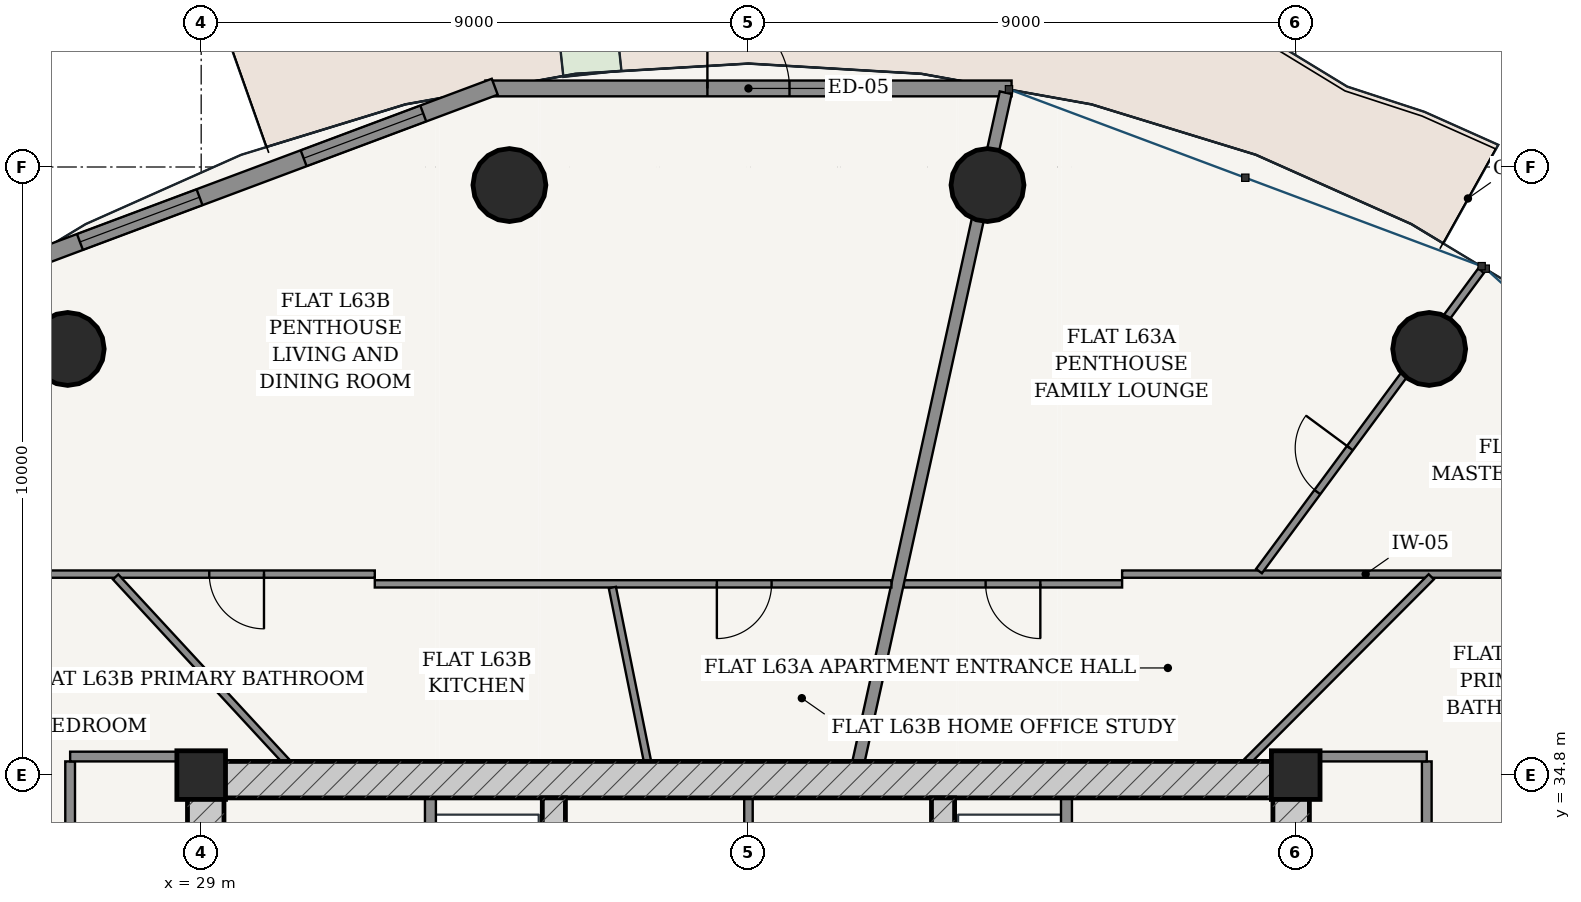
"""IFC4 building model, lengths in metres.
Left out: names, types, materials, properties, quantities, classifications, styles, units other than length and angle.
Written with IfcOpenShell. Run it as: python <this file> out.ifc"""

import sys

from ifc_helpers import new_model, si_unit, direction, frame, frame_2d, origin, origin_2d, place, context, subcontext, project, spatial, rectangle, hollow_circle, extrude, source, transform, mapped, element, fill, save


model = new_model("IFC4")
c1 = context("Model", 3, precision=1e-05, world=origin(), true_north=direction((-0.2419218956, 0.970295726276)))
c2 = subcontext(c1, "Body", "Model", "MODEL_VIEW")
j1 = project(units=[si_unit("LENGTHUNIT", "METRE"), si_unit("PLANEANGLEUNIT", "RADIAN")], contexts=[c1])
p1 = place(None, origin())
s1 = spatial("IfcSite", under=j1, at=p1, CompositionType="ELEMENT")
p2 = place(p1, origin())
s2 = spatial("IfcBuilding", under=s1, at=p2, CompositionType="ELEMENT")
p3 = place(p2, frame((0.0, 0.0, 239.3)))
s3 = spatial("IfcBuildingStorey", under=s2, at=p3, CompositionType="ELEMENT", Elevation=239.3)
for number, where, z_axis, x_axis in (
    (1, (47.0, 34.8, 0.0), (0.0, 0.0, 1.0), (1.0, 0.0, 0.0)),
    (2, (29.0, 34.8, 0.0), (0.0, 0.0, 1.0), (1.0, 0.0, 0.0)),
):
    element("IfcColumn", number, at=place(p3, frame(where, z_axis=z_axis, x_axis=x_axis)), inside=s3, PredefinedType="COLUMN", context=c2, shape_type="SweptSolid", body=[
        extrude(rectangle(XDim=0.8, YDim=0.8, at=origin_2d()), origin(), (0.0, 0.0, 1.0), 3.7),
    ])
p4 = place(p3, frame((28.775, 34.725, 0.0), z_axis=(0.0, 0.0, 1.0), x_axis=(1.0, 0.0, 0.0)))
e3 = element("IfcWall", 3, at=p4, inside=s3, PredefinedType="SHEAR", context=c2, shape_type="SweptSolid", body=[
    extrude(rectangle(XDim=18.45, YDim=0.6, at=frame_2d((9.225, 0.0))), origin(), (0.0, 0.0, 1.0), 3.25),
])
p5 = place(p3, frame((29.075, 19.175, 0.0), z_axis=(0.0, 0.0, 1.0), x_axis=(0.0, 1.0, 0.0)))
e4 = element("IfcWall", 4, at=p5, inside=s3, PredefinedType="SHEAR", context=c2, shape_type="SweptSolid", body=[
    extrude(rectangle(XDim=15.25, YDim=0.6, at=frame_2d((7.625, 0.0))), origin(), (0.0, 0.0, 1.0), 3.25),
])
p6 = place(p5, frame((9.875, 0.0, 0.0)))
e5 = element("IfcOpeningElement", 5, at=p6, cuts=e4, PredefinedType="OPENING", context=c2, shape_type="SweptSolid", body=[
    extrude(rectangle(XDim=1.5, YDim=2.2, at=frame_2d((0.75, 1.1))), frame((0.0, 0.31, 0.0), z_axis=(0.0, -1.0, 0.0), x_axis=(1.0, 0.0, 0.0)), (0.0, 0.0, 1.0), 0.62),
])
p7 = place(p3, frame((46.925, 19.175, 0.0), z_axis=(0.0, 0.0, 1.0), x_axis=(0.0, 1.0, 0.0)))
e6 = element("IfcWall", 6, at=p7, inside=s3, PredefinedType="SHEAR", context=c2, shape_type="SweptSolid", body=[
    extrude(rectangle(XDim=15.25, YDim=0.6, at=frame_2d((7.625, 0.0))), origin(), (0.0, 0.0, 1.0), 3.25),
])
p8 = place(p7, frame((9.875, 0.0, 0.0)))
e7 = element("IfcOpeningElement", 7, at=p8, cuts=e6, PredefinedType="OPENING", context=c2, shape_type="SweptSolid", body=[
    extrude(rectangle(XDim=1.5, YDim=2.2, at=frame_2d((0.75, 1.1))), frame((0.0, 0.31, 0.0), z_axis=(0.0, -1.0, 0.0), x_axis=(1.0, 0.0, 0.0)), (0.0, 0.0, 1.0), 0.62),
])
p9 = place(p3, frame((34.8, 19.175, 0.0), z_axis=(0.0, 0.0, 1.0), x_axis=(0.0, 1.0, 0.0)))
e8 = element("IfcWall", 8, at=p9, inside=s3, PredefinedType="SHEAR", context=c2, shape_type="SweptSolid", body=[
    extrude(rectangle(XDim=15.25, YDim=0.38, at=frame_2d((7.625, 0.0))), origin(), (0.0, 0.0, 1.0), 3.25),
])
p10 = place(p9, frame((7.8, 0.0, 0.0)))
e9 = element("IfcOpeningElement", 9, at=p10, cuts=e8, PredefinedType="OPENING", context=c2, shape_type="SweptSolid", body=[
    extrude(rectangle(XDim=1.05, YDim=2.15, at=frame_2d((0.525, 1.075))), frame((0.0, 0.2, 0.0), z_axis=(0.0, -1.0, 0.0), x_axis=(1.0, 0.0, 0.0)), (0.0, 0.0, 1.0), 0.4),
])
p11 = place(p3, frame((41.2, 19.175, 0.0), z_axis=(0.0, 0.0, 1.0), x_axis=(0.0, 1.0, 0.0)))
e10 = element("IfcWall", 10, at=p11, inside=s3, PredefinedType="SHEAR", context=c2, shape_type="SweptSolid", body=[
    extrude(rectangle(XDim=15.25, YDim=0.38, at=frame_2d((7.625, 0.0))), origin(), (0.0, 0.0, 1.0), 3.25),
])
p12 = place(p11, frame((7.8, 0.0, 0.0)))
e11 = element("IfcOpeningElement", 11, at=p12, cuts=e10, PredefinedType="OPENING", context=c2, shape_type="SweptSolid", body=[
    extrude(rectangle(XDim=1.05, YDim=2.15, at=frame_2d((0.525, 1.075))), frame((0.0, 0.2, 0.0), z_axis=(0.0, -1.0, 0.0), x_axis=(1.0, 0.0, 0.0)), (0.0, 0.0, 1.0), 0.4),
])
for number, where, z_axis, x_axis in (
    (12, (49.195, 41.808, 0.0), (0.0, 0.0, 1.0), (1.0, 0.0, 0.0)),
    (13, (41.931, 44.503, 0.0), (0.0, 0.0, 1.0), (1.0, 0.0, 0.0)),
    (14, (34.069, 44.503, 0.0), (0.0, 0.0, 1.0), (1.0, 0.0, 0.0)),
    (15, (26.805, 41.808, 0.0), (0.0, 0.0, 1.0), (1.0, 0.0, 0.0)),
):
    element("IfcColumn", number, at=place(p3, frame(where, z_axis=z_axis, x_axis=x_axis)), inside=s3, PredefinedType="COLUMN", context=c2, shape_type="SweptSolid", body=[
        extrude(hollow_circle(Radius=0.6, WallThickness=0.038, at=origin_2d()), origin(), (0.0, 0.0, 1.0), 3.7),
    ])
p13 = place(p3, frame((42.327, 46.092, 0.0), z_axis=(0.0, 0.0, 1.0), x_axis=(-1.0, 0.0, 0.0)))
e16 = element("IfcWall", 16, at=p13, inside=s3, PredefinedType="SOLIDWALL", context=c2, shape_type="SweptSolid", body=[
    extrude(rectangle(XDim=8.654, YDim=0.26, at=frame_2d((4.327, 0.0))), origin(), (0.0, 0.0, 1.0), 3.25),
])
p14 = place(p13, frame((3.652, 0.0, 0.0)))
e17 = element("IfcOpeningElement", 17, at=p14, cuts=e16, PredefinedType="OPENING", context=c2, shape_type="SweptSolid", body=[
    extrude(rectangle(XDim=1.35, YDim=2.2, at=frame_2d((0.675, 1.1))), frame((0.0, 0.14, 0.0), z_axis=(0.0, -1.0, 0.0), x_axis=(1.0, 0.0, 0.0)), (0.0, 0.0, 1.0), 0.28),
])
p15 = place(p3, frame((33.828, 46.12, 0.0), z_axis=(0.0, 0.0, 1.0), x_axis=(-0.936556918375, -0.350515532672, 0.0)))
e18 = element("IfcWall", 18, at=p15, inside=s3, PredefinedType="SOLIDWALL", context=c2, shape_type="SweptSolid", body=[
    extrude(rectangle(XDim=8.539, YDim=0.28, at=frame_2d((4.27, 0.0))), origin(), (0.0, 0.0, 1.0), 3.25),
])
p16 = place(p15, frame((1.256, 0.0, 0.85)))
e19 = element("IfcOpeningElement", 19, at=p16, cuts=e18, PredefinedType="OPENING", context=c2, shape_type="SweptSolid", body=[
    extrude(rectangle(XDim=2.1, YDim=1.95, at=frame_2d((1.05, 0.975))), frame((0.0, 0.15, 0.0), z_axis=(0.0, -1.0, 0.0), x_axis=(1.0, 0.0, 0.0)), (0.0, 0.0, 1.0), 0.3),
])
p17 = place(p15, frame((5.184, 0.0, 0.85)))
e20 = element("IfcOpeningElement", 20, at=p17, cuts=e18, PredefinedType="OPENING", context=c2, shape_type="SweptSolid", body=[
    extrude(rectangle(XDim=2.1, YDim=1.95, at=frame_2d((1.05, 0.975))), frame((0.0, 0.15, 0.0), z_axis=(0.0, -1.0, 0.0), x_axis=(1.0, 0.0, 0.0)), (0.0, 0.0, 1.0), 0.3),
])
p18 = place(p3, frame((32.77, 28.52, 0.0), z_axis=(0.0, 0.0, 1.0), x_axis=(0.0, 1.0, 0.0)))
e21 = element("IfcWall", 21, at=p18, inside=s3, PredefinedType="PARTITIONING", context=c2, shape_type="SweptSolid", body=[
    extrude(rectangle(XDim=5.905, YDim=0.18, at=frame_2d((2.953, 0.0))), origin(), (0.0, 0.0, 1.0), 3.25),
])
p19 = place(p18, frame((3.655, 0.0, 0.0)))
e22 = element("IfcOpeningElement", 22, at=p19, cuts=e21, PredefinedType="OPENING", context=c2, shape_type="SweptSolid", body=[
    extrude(rectangle(XDim=1.15, YDim=2.2, at=frame_2d((0.575, 1.1))), frame((0.0, 0.1, 0.0), z_axis=(0.0, -1.0, 0.0), x_axis=(1.0, 0.0, 0.0)), (0.0, 0.0, 1.0), 0.2),
])
p20 = place(p18, frame((0.73, 0.0, 0.0)))
e23 = element("IfcOpeningElement", 23, at=p20, cuts=e21, PredefinedType="OPENING", context=c2, shape_type="SweptSolid", body=[
    extrude(rectangle(XDim=1.2, YDim=2.25, at=frame_2d((0.6, 1.125))), frame((0.0, 0.1, 0.0), z_axis=(0.0, -1.0, 0.0), x_axis=(1.0, 0.0, 0.0)), (0.0, 0.0, 1.0), 0.2),
])
p21 = place(p3, frame((43.23, 28.52, 0.0), z_axis=(0.0, 0.0, 1.0), x_axis=(0.0, 1.0, 0.0)))
e24 = element("IfcWall", 24, at=p21, inside=s3, PredefinedType="PARTITIONING", context=c2, shape_type="SweptSolid", body=[
    extrude(rectangle(XDim=5.905, YDim=0.18, at=frame_2d((2.953, 0.0))), origin(), (0.0, 0.0, 1.0), 3.25),
])
p22 = place(p21, frame((0.905, 0.0, 0.0)))
e25 = element("IfcOpeningElement", 25, at=p22, cuts=e24, PredefinedType="OPENING", context=c2, shape_type="SweptSolid", body=[
    extrude(rectangle(XDim=0.85, YDim=2.1, at=frame_2d((0.425, 1.05))), frame((0.0, 0.1, 0.0), z_axis=(0.0, -1.0, 0.0), x_axis=(1.0, 0.0, 0.0)), (0.0, 0.0, 1.0), 0.2),
])
p23 = place(p21, frame((3.655, 0.0, 0.0)))
e26 = element("IfcOpeningElement", 26, at=p23, cuts=e24, PredefinedType="OPENING", context=c2, shape_type="SweptSolid", body=[
    extrude(rectangle(XDim=1.15, YDim=2.2, at=frame_2d((0.575, 1.1))), frame((0.0, 0.1, 0.0), z_axis=(0.0, -1.0, 0.0), x_axis=(1.0, 0.0, 0.0)), (0.0, 0.0, 1.0), 0.2),
])
p24 = place(p3, frame((38.0, 28.56, 0.0), z_axis=(0.0, 0.0, 1.0), x_axis=(0.0, 1.0, 0.0)))
e27 = element("IfcWall", 27, at=p24, inside=s3, PredefinedType="PARTITIONING", context=c2, shape_type="SweptSolid", body=[
    extrude(rectangle(XDim=5.865, YDim=0.14, at=frame_2d((2.933, 0.0))), origin(), (0.0, 0.0, 1.0), 3.25),
])
p25 = place(p3, frame((26.845, 24.4, 0.0), z_axis=(0.0, 0.0, 1.0), x_axis=(0.0, 1.0, 0.0)))
e28 = element("IfcWall", 28, at=p25, inside=s3, PredefinedType="PARTITIONING", context=c2, shape_type="SweptSolid", body=[
    extrude(rectangle(XDim=10.625, YDim=0.16, at=frame_2d((5.312, 0.0))), origin(), (0.0, 0.0, 1.0), 2.775),
])
p26 = place(p25, frame((4.936, 0.0, 0.0)))
e29 = element("IfcOpeningElement", 29, at=p26, cuts=e28, PredefinedType="OPENING", context=c2, shape_type="SweptSolid", body=[
    extrude(rectangle(XDim=0.98, YDim=2.2, at=frame_2d((0.49, 1.1))), frame((0.0, 0.09, 0.0), z_axis=(0.0, -1.0, 0.0), x_axis=(1.0, 0.0, 0.0)), (0.0, 0.0, 1.0), 0.18),
])
p27 = place(p3, frame((26.845, 35.105, 0.0), z_axis=(0.0, 0.0, 1.0), x_axis=(1.0, 0.0, 0.0)))
e30 = element("IfcWall", 30, at=p27, inside=s3, PredefinedType="PARTITIONING", context=c2, shape_type="SweptSolid", body=[
    extrude(rectangle(XDim=1.93, YDim=0.16, at=frame_2d((0.965, 0.0))), origin(), (0.0, 0.0, 1.0), 3.25),
])
p28 = place(p3, frame((49.155, 16.725, 0.0), z_axis=(0.0, 0.0, 1.0), x_axis=(0.0, 1.0, 0.0)))
e31 = element("IfcWall", 31, at=p28, inside=s3, PredefinedType="PARTITIONING", context=c2, shape_type="SweptSolid", body=[
    extrude(rectangle(XDim=18.3, YDim=0.16, at=frame_2d((9.15, 0.0))), origin(), (0.0, 0.0, 1.0), 2.775),
])
p29 = place(p28, frame((7.401, 0.0, 0.0)))
e32 = element("IfcOpeningElement", 32, at=p29, cuts=e31, PredefinedType="OPENING", context=c2, shape_type="SweptSolid", body=[
    extrude(rectangle(XDim=0.98, YDim=2.2, at=frame_2d((0.49, 1.1))), frame((0.0, 0.09, 0.0), z_axis=(0.0, -1.0, 0.0), x_axis=(1.0, 0.0, 0.0)), (0.0, 0.0, 1.0), 0.18),
])
p30 = place(p3, frame((47.225, 35.105, 0.0), z_axis=(0.0, 0.0, 1.0), x_axis=(1.0, 0.0, 0.0)))
e33 = element("IfcWall", 33, at=p30, inside=s3, PredefinedType="PARTITIONING", context=c2, shape_type="SweptSolid", body=[
    extrude(rectangle(XDim=1.93, YDim=0.16, at=frame_2d((0.965, 0.0))), origin(), (0.0, 0.0, 1.0), 3.25),
])
p31 = place(p3, frame((40.555, 37.945, 0.0), z_axis=(0.0, 0.0, 1.0), x_axis=(1.0, 0.0, 0.0)))
e34 = element("IfcWall", 34, at=p31, inside=s3, PredefinedType="PARTITIONING", context=c2, shape_type="SweptSolid", body=[
    extrude(rectangle(XDim=3.59, YDim=0.12, at=frame_2d((1.795, 0.0))), origin(), (0.0, 0.0, 1.0), 3.25),
])
p32 = place(p31, frame((1.345, 0.0, 0.0)))
e35 = element("IfcOpeningElement", 35, at=p32, cuts=e34, PredefinedType="OPENING", context=c2, shape_type="SweptSolid", body=[
    extrude(rectangle(XDim=0.9, YDim=2.15, at=frame_2d((0.45, 1.075))), frame((0.0, 0.07, 0.0), z_axis=(0.0, -1.0, 0.0), x_axis=(1.0, 0.0, 0.0)), (0.0, 0.0, 1.0), 0.14),
])
p33 = place(p3, frame((44.145, 38.105, 0.0), z_axis=(0.0, 0.0, 1.0), x_axis=(1.0, 0.0, 0.0)))
e36 = element("IfcWall", 36, at=p33, inside=s3, PredefinedType="PARTITIONING", context=c2, shape_type="SweptSolid", body=[
    extrude(rectangle(XDim=8.01, YDim=0.12, at=frame_2d((4.005, 0.0))), origin(), (0.0, 0.0, 1.0), 2.775),
])
p34 = place(p3, frame((46.396, 38.155, 0.0), z_axis=(0.0, 0.0, 1.0), x_axis=(0.594526205526, 0.804076234535, 0.0)))
e37 = element("IfcWall", 37, at=p34, inside=s3, PredefinedType="PARTITIONING", context=c2, shape_type="SweptSolid", body=[
    extrude(rectangle(XDim=6.146, YDim=0.12, at=frame_2d((3.073, 0.0))), origin(), (0.0, 0.0, 1.0), 2.6),
])
p35 = place(p34, frame((1.615, 0.0, 0.0)))
e38 = element("IfcOpeningElement", 38, at=p35, cuts=e37, PredefinedType="OPENING", context=c2, shape_type="SweptSolid", body=[
    extrude(rectangle(XDim=0.9, YDim=2.15, at=frame_2d((0.45, 1.075))), frame((0.0, 0.07, 0.0), z_axis=(0.0, -1.0, 0.0), x_axis=(1.0, 0.0, 0.0)), (0.0, 0.0, 1.0), 0.14),
])
p36 = place(p3, frame((46.203, 35.026, 0.0), z_axis=(0.0, 0.0, 1.0), x_axis=(0.706080585752, 0.708131489502, 0.0)))
e39 = element("IfcWall", 39, at=p36, inside=s3, PredefinedType="PARTITIONING", context=c2, shape_type="SweptSolid", body=[
    extrude(rectangle(XDim=4.285, YDim=0.12, at=frame_2d((2.143, 0.0))), origin(), (0.0, 0.0, 1.0), 2.775),
])
p37 = place(p3, frame((39.811, 35.027, 0.0), z_axis=(0.0, 0.0, 1.0), x_axis=(0.214966857327, 0.976621344356, 0.0)))
e40 = element("IfcWall", 40, at=p37, inside=s3, PredefinedType="PARTITIONING", context=c2, shape_type="SweptSolid", body=[
    extrude(rectangle(XDim=11.258, YDim=0.2, at=frame_2d((5.629, 0.0))), origin(), (0.0, 0.0, 1.0), 2.34),
])
p38 = place(p3, frame((23.845, 38.105, 0.0), z_axis=(0.0, 0.0, 1.0), x_axis=(1.0, 0.0, 0.0)))
e41 = element("IfcWall", 41, at=p38, inside=s3, PredefinedType="PARTITIONING", context=c2, shape_type="SweptSolid", body=[
    extrude(rectangle(XDim=8.01, YDim=0.12, at=frame_2d((4.005, 0.0))), origin(), (0.0, 0.0, 1.0), 2.775),
])
p39 = place(p38, frame((5.288, 0.0, 0.0)))
e42 = element("IfcOpeningElement", 42, at=p39, cuts=e41, PredefinedType="OPENING", context=c2, shape_type="SweptSolid", body=[
    extrude(rectangle(XDim=0.9, YDim=2.15, at=frame_2d((0.45, 1.075))), frame((0.0, 0.07, 0.0), z_axis=(0.0, -1.0, 0.0), x_axis=(1.0, 0.0, 0.0)), (0.0, 0.0, 1.0), 0.14),
])
p40 = place(p3, frame((31.855, 37.945, 0.0), z_axis=(0.0, 0.0, 1.0), x_axis=(1.0, 0.0, 0.0)))
e43 = element("IfcWall", 43, at=p40, inside=s3, PredefinedType="PARTITIONING", context=c2, shape_type="SweptSolid", body=[
    extrude(rectangle(XDim=8.496, YDim=0.12, at=frame_2d((4.248, 0.0))), origin(), (0.0, 0.0, 1.0), 2.775),
])
p41 = place(p40, frame((5.625, 0.0, 0.0)))
e44 = element("IfcOpeningElement", 44, at=p41, cuts=e43, PredefinedType="OPENING", context=c2, shape_type="SweptSolid", body=[
    extrude(rectangle(XDim=0.9, YDim=2.15, at=frame_2d((0.45, 1.075))), frame((0.0, 0.07, 0.0), z_axis=(0.0, -1.0, 0.0), x_axis=(1.0, 0.0, 0.0)), (0.0, 0.0, 1.0), 0.14),
])
p42 = place(p3, frame((36.339, 35.027, 0.0), z_axis=(0.0, 0.0, 1.0), x_axis=(-0.197903570547, 0.980221493727, 0.0)))
e45 = element("IfcWall", 45, at=p42, inside=s3, PredefinedType="PARTITIONING", context=c2, shape_type="SweptSolid", body=[
    extrude(rectangle(XDim=2.915, YDim=0.12, at=frame_2d((1.458, 0.0))), origin(), (0.0, 0.0, 1.0), 2.34),
])
p43 = place(p3, frame((30.396, 35.026, 0.0), z_axis=(0.0, 0.0, 1.0), x_axis=(-0.678748871003, 0.73437045836, 0.0)))
e46 = element("IfcWall", 46, at=p43, inside=s3, PredefinedType="PARTITIONING", context=c2, shape_type="SweptSolid", body=[
    extrude(rectangle(XDim=4.13, YDim=0.12, at=frame_2d((2.065, 0.0))), origin(), (0.0, 0.0, 1.0), 2.775),
])
p44 = place(p3, frame((26.765, 32.845, 0.0), z_axis=(0.0, 0.0, 1.0), x_axis=(-0.88057708661, 0.473902937886, 0.0)))
e47 = element("IfcWall", 47, at=p44, inside=s3, PredefinedType="PARTITIONING", context=c2, shape_type="SweptSolid", body=[
    extrude(rectangle(XDim=3.254, YDim=0.12, at=frame_2d((1.627, 0.0))), origin(), (0.0, 0.0, 1.0), 2.969),
])
p45 = place(p44, frame((1.197, 0.0, 0.0)))
e48 = element("IfcOpeningElement", 48, at=p45, cuts=e47, PredefinedType="OPENING", context=c2, shape_type="SweptSolid", body=[
    extrude(rectangle(XDim=0.86, YDim=2.15, at=frame_2d((0.43, 1.075))), frame((0.0, 0.07, 0.0), z_axis=(0.0, -1.0, 0.0), x_axis=(1.0, 0.0, 0.0)), (0.0, 0.0, 1.0), 0.14),
])
m1 = source(origin(), c2, "Body", "SweptSolid", [
    extrude(rectangle(XDim=1.35, YDim=2.2, at=frame_2d((0.675, 1.1))), frame((0.0, 0.025, 0.0), z_axis=(0.0, -1.0, 0.0), x_axis=(1.0, 0.0, 0.0)), (0.0, 0.0, 1.0), 0.05),
])
p46 = place(p14, frame((1.35, 0.0, 0.0), z_axis=(0.0, 0.0, 1.0), x_axis=(-1.0, 0.0, 0.0)))
e49 = element("IfcDoor", 49, at=p46, inside=s3, OperationType="SINGLE_SWING_LEFT", PredefinedType="DOOR", context=c2, shape_type="MappedRepresentation", body=[
    mapped(m1, transform((0.0, 0.0, 0.0), scale=1.0)),
])
fill(e17, e49)
m2 = source(origin(), c2, "Body", "SweptSolid", [
    extrude(rectangle(XDim=2.1, YDim=1.95, at=frame_2d((1.05, 0.975))), frame((0.0, 0.03, 0.0), z_axis=(0.0, -1.0, 0.0), x_axis=(1.0, 0.0, 0.0)), (0.0, 0.0, 1.0), 0.06),
])
p47 = place(p16, origin())
e50 = element("IfcWindow", 50, at=p47, inside=s3, PartitioningType="SINGLE_PANEL", PredefinedType="WINDOW", context=c2, shape_type="MappedRepresentation", body=[
    mapped(m2, transform((0.0, 0.0, 0.0), scale=1.0)),
])
fill(e19, e50)
p48 = place(p17, origin())
e51 = element("IfcWindow", 51, at=p48, inside=s3, PartitioningType="SINGLE_PANEL", PredefinedType="WINDOW", context=c2, shape_type="MappedRepresentation", body=[
    mapped(m2, transform((0.0, 0.0, 0.0), scale=1.0)),
])
fill(e20, e51)
m3 = source(origin(), c2, "Body", "SweptSolid", [
    extrude(rectangle(XDim=0.9, YDim=2.15, at=frame_2d((0.45, 1.075))), frame((0.0, 0.025, 0.0), z_axis=(0.0, -1.0, 0.0), x_axis=(1.0, 0.0, 0.0)), (0.0, 0.0, 1.0), 0.05),
])
p49 = place(p35, origin())
e52 = element("IfcDoor", 52, at=p49, inside=s3, OperationType="SINGLE_SWING_RIGHT", PredefinedType="DOOR", context=c2, shape_type="MappedRepresentation", body=[
    mapped(m3, transform((0.0, 0.0, 0.0), scale=1.0)),
])
fill(e38, e52)
p50 = place(p32, frame((0.9, 0.0, 0.0), z_axis=(0.0, 0.0, 1.0), x_axis=(-1.0, 0.0, 0.0)))
e53 = element("IfcDoor", 53, at=p50, inside=s3, OperationType="SINGLE_SWING_LEFT", PredefinedType="DOOR", context=c2, shape_type="MappedRepresentation", body=[
    mapped(m3, transform((0.0, 0.0, 0.0), scale=1.0)),
])
fill(e35, e53)
p51 = place(p39, frame((0.9, 0.0, 0.0), z_axis=(0.0, 0.0, 1.0), x_axis=(-1.0, 0.0, 0.0)))
e54 = element("IfcDoor", 54, at=p51, inside=s3, OperationType="SINGLE_SWING_LEFT", PredefinedType="DOOR", context=c2, shape_type="MappedRepresentation", body=[
    mapped(m3, transform((0.0, 0.0, 0.0), scale=1.0)),
])
fill(e42, e54)
p52 = place(p41, frame((0.9, 0.0, 0.0), z_axis=(0.0, 0.0, 1.0), x_axis=(-1.0, 0.0, 0.0)))
e55 = element("IfcDoor", 55, at=p52, inside=s3, OperationType="SINGLE_SWING_RIGHT", PredefinedType="DOOR", context=c2, shape_type="MappedRepresentation", body=[
    mapped(m3, transform((0.0, 0.0, 0.0), scale=1.0)),
])
fill(e44, e55)
save(model, sys.argv[1])
